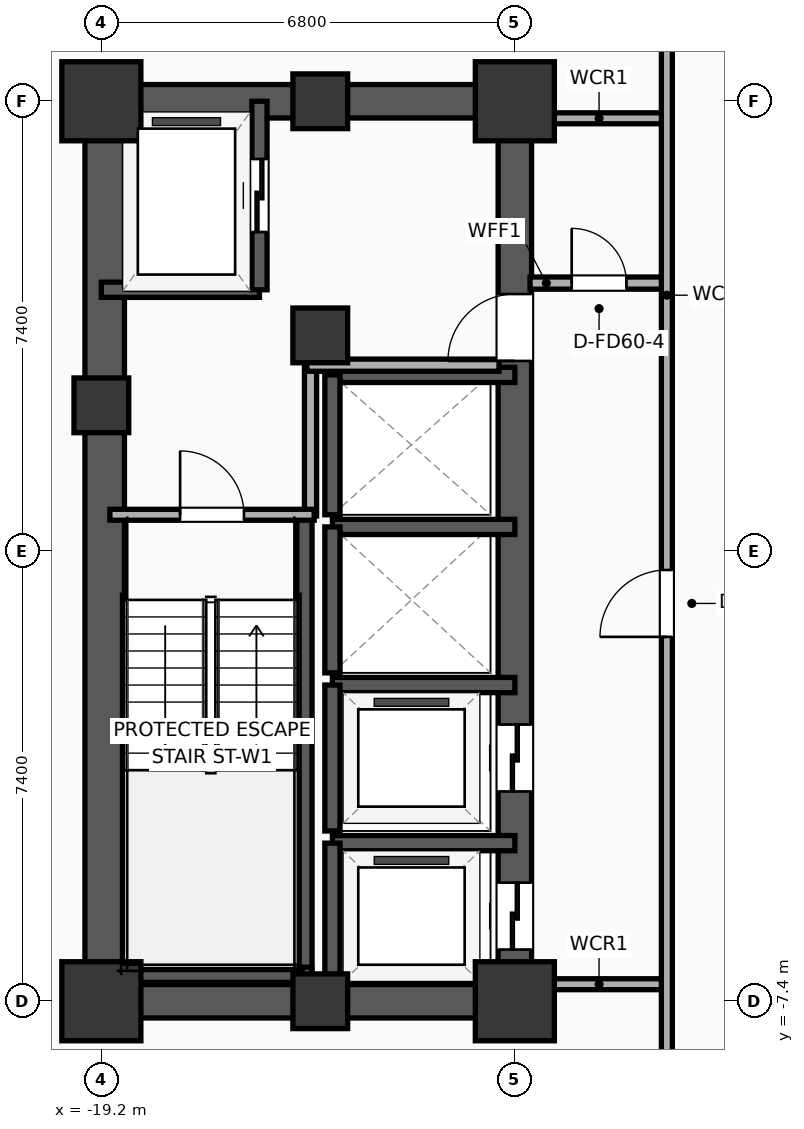
"""IFC4 building model, lengths in metres.
Left out: names, types, materials, properties, quantities, classifications, styles, units other than length and angle.
Written with IfcOpenShell. Run it as: python <this file> out.ifc"""

import sys

from ifc_helpers import new_model, si_unit, direction, frame, frame_2d, origin, origin_2d, place, context, subcontext, project, spatial, rectangle, extrude, element, fill, save


model = new_model("IFC4")
c1 = context("Model", 3, precision=1e-05, world=origin(), true_north=direction((0.0, 1.0)))
c2 = subcontext(c1, "Body", "Model", "MODEL_VIEW")
j1 = project(units=[si_unit("LENGTHUNIT", "METRE"), si_unit("PLANEANGLEUNIT", "RADIAN")], contexts=[c1])
p1 = place(None, origin())
s1 = spatial("IfcSite", under=j1, at=p1, CompositionType="ELEMENT")
p2 = place(p1, origin())
s2 = spatial("IfcBuilding", under=s1, at=p2, CompositionType="ELEMENT")
p3 = place(p2, frame((0.0, 0.0, 105.3)))
s3 = spatial("IfcBuildingStorey", under=s2, at=p3, CompositionType="ELEMENT", Elevation=105.3)
p4 = place(p3, frame((-19.2, -7.4, 0.0), z_axis=(0.0, 0.0, 1.0), x_axis=(1.0, 0.0, 0.0)))
e1 = element("IfcColumn", 1, at=p4, inside=s3, PredefinedType="COLUMN", context=c2, shape_type="SweptSolid", body=[
    extrude(rectangle(XDim=1.3, YDim=1.3, at=origin_2d()), origin(), (0.0, 0.0, 1.0), 3.9),
])
p5 = place(p3, frame((-19.2, 2.4, 0.0), z_axis=(0.0, 0.0, 1.0), x_axis=(1.0, 0.0, 0.0)))
e2 = element("IfcColumn", 2, at=p5, inside=s3, PredefinedType="COLUMN", context=c2, shape_type="SweptSolid", body=[
    extrude(rectangle(XDim=0.9, YDim=0.9, at=origin_2d()), origin(), (0.0, 0.0, 1.0), 3.9),
])
p6 = place(p3, frame((-19.2, 7.4, 0.0), z_axis=(0.0, 0.0, 1.0), x_axis=(1.0, 0.0, 0.0)))
e3 = element("IfcColumn", 3, at=p6, inside=s3, PredefinedType="COLUMN", context=c2, shape_type="SweptSolid", body=[
    extrude(rectangle(XDim=1.3, YDim=1.3, at=origin_2d()), origin(), (0.0, 0.0, 1.0), 3.9),
])
for number, where, z_axis, x_axis in (
    (4, (-15.6, -7.4, 0.0), (0.0, 0.0, 1.0), (1.0, 0.0, 0.0)),
    (5, (-15.6, 7.4, 0.0), (0.0, 0.0, 1.0), (1.0, 0.0, 0.0)),
):
    element("IfcColumn", number, at=place(p3, frame(where, z_axis=z_axis, x_axis=x_axis)), inside=s3, PredefinedType="COLUMN", context=c2, shape_type="SweptSolid", body=[
        extrude(rectangle(XDim=0.9, YDim=0.9, at=origin_2d()), origin(), (0.0, 0.0, 1.0), 3.9),
    ])
p7 = place(p3, frame((-12.4, -7.4, 0.0), z_axis=(0.0, 0.0, 1.0), x_axis=(1.0, 0.0, 0.0)))
e6 = element("IfcColumn", 6, at=p7, inside=s3, PredefinedType="COLUMN", context=c2, shape_type="SweptSolid", body=[
    extrude(rectangle(XDim=1.3, YDim=1.3, at=origin_2d()), origin(), (0.0, 0.0, 1.0), 3.9),
])
p8 = place(p3, frame((-15.6, 3.55, 0.0), z_axis=(0.0, 0.0, 1.0), x_axis=(1.0, 0.0, 0.0)))
e7 = element("IfcColumn", 7, at=p8, inside=s3, PredefinedType="COLUMN", context=c2, shape_type="SweptSolid", body=[
    extrude(rectangle(XDim=0.9, YDim=0.9, at=origin_2d()), origin(), (0.0, 0.0, 1.0), 3.9),
])
p9 = place(p3, frame((-12.4, 7.4, 0.0), z_axis=(0.0, 0.0, 1.0), x_axis=(1.0, 0.0, 0.0)))
e8 = element("IfcColumn", 8, at=p9, inside=s3, PredefinedType="COLUMN", context=c2, shape_type="SweptSolid", body=[
    extrude(rectangle(XDim=1.3, YDim=1.3, at=origin_2d()), origin(), (0.0, 0.0, 1.0), 3.9),
])
for number, where, z_axis, x_axis in (
    (9, (-19.475, -7.4, 0.0), (0.0, 0.0, 1.0), (1.0, 0.0, 0.0)),
    (10, (-19.475, 7.4, 0.0), (0.0, 0.0, 1.0), (1.0, 0.0, 0.0)),
):
    element("IfcWall", number, at=place(p3, frame(where, z_axis=z_axis, x_axis=x_axis)), inside=s3, PredefinedType="SHEAR", context=c2, shape_type="SweptSolid", body=[
        extrude(rectangle(XDim=7.35, YDim=0.55, at=frame_2d((3.675, 0.0))), origin(), (0.0, 0.0, 1.0), 3.65),
    ])
p10 = place(p3, frame((-19.145, -7.4, 0.0), z_axis=(0.0, 0.0, 1.0), x_axis=(0.0, 1.0, 0.0)))
e11 = element("IfcWall", 11, at=p10, inside=s3, PredefinedType="SHEAR", context=c2, shape_type="SweptSolid", body=[
    extrude(rectangle(XDim=14.8, YDim=0.65, at=frame_2d((7.4, 0.0))), origin(), (0.0, 0.0, 1.0), 3.65),
])
p11 = place(p3, frame((-12.4, -7.4, 0.0), z_axis=(0.0, 0.0, 1.0), x_axis=(0.0, 1.0, 0.0)))
e12 = element("IfcWall", 12, at=p11, inside=s3, PredefinedType="SHEAR", context=c2, shape_type="SweptSolid", body=[
    extrude(rectangle(XDim=14.8, YDim=0.55, at=frame_2d((7.4, 0.0))), origin(), (0.0, 0.0, 1.0), 3.65),
])
p12 = place(p11, frame((0.85, 0.0, 0.0)))
e13 = element("IfcOpeningElement", 13, at=p12, cuts=e12, PredefinedType="OPENING", context=c2, shape_type="SweptSolid", body=[
    extrude(rectangle(XDim=1.1, YDim=2.05, at=frame_2d((0.55, 1.025))), frame((0.0, 0.285, 0.0), z_axis=(0.0, -1.0, 0.0), x_axis=(1.0, 0.0, 0.0)), (0.0, 0.0, 1.0), 0.57),
])
p13 = place(p11, frame((3.45, 0.0, 0.0)))
e14 = element("IfcOpeningElement", 14, at=p13, cuts=e12, PredefinedType="OPENING", context=c2, shape_type="SweptSolid", body=[
    extrude(rectangle(XDim=1.1, YDim=2.05, at=frame_2d((0.55, 1.025))), frame((0.0, 0.285, 0.0), z_axis=(0.0, -1.0, 0.0), x_axis=(1.0, 0.0, 0.0)), (0.0, 0.0, 1.0), 0.57),
])
p14 = place(p11, frame((10.53, 0.0, 0.0)))
e15 = element("IfcOpeningElement", 15, at=p14, cuts=e12, PredefinedType="OPENING", context=c2, shape_type="SweptSolid", body=[
    extrude(rectangle(XDim=1.1, YDim=2.05, at=frame_2d((0.55, 1.025))), frame((0.0, 0.285, 0.0), z_axis=(0.0, -1.0, 0.0), x_axis=(1.0, 0.0, 0.0)), (0.0, 0.0, 1.0), 0.57),
])
p15 = place(p3, frame((-15.86, -7.085, 0.0), z_axis=(0.0, 0.0, 1.0), x_axis=(0.0, 1.0, 0.0)))
e16 = element("IfcWall", 16, at=p15, inside=s3, PredefinedType="SOLIDWALL", context=c2, shape_type="SweptSolid", body=[
    extrude(rectangle(XDim=7.685, YDim=0.25, at=frame_2d((3.843, 0.0))), origin(), (0.0, 0.0, 1.0), 3.65),
])
p16 = place(p3, frame((-19.2, -6.965, 0.0), z_axis=(0.0, 0.0, 1.0), x_axis=(1.0, 0.0, 0.0)))
e17 = element("IfcWall", 17, at=p16, inside=s3, PredefinedType="SOLIDWALL", context=c2, shape_type="SweptSolid", body=[
    extrude(rectangle(XDim=3.46, YDim=0.25, at=frame_2d((1.73, 0.0))), origin(), (0.0, 0.0, 1.0), 3.65),
])
p17 = place(p3, frame((-19.2, 4.3, 0.0), z_axis=(0.0, 0.0, 1.0), x_axis=(1.0, 0.0, 0.0)))
e18 = element("IfcWall", 18, at=p17, inside=s3, PredefinedType="SOLIDWALL", context=c2, shape_type="SweptSolid", body=[
    extrude(rectangle(XDim=2.6, YDim=0.25, at=frame_2d((1.3, 0.0))), origin(), (0.0, 0.0, 1.0), 3.65),
])
p18 = place(p3, frame((-16.6, 4.3, 0.0), z_axis=(0.0, 0.0, 1.0), x_axis=(0.0, 1.0, 0.0)))
e19 = element("IfcWall", 19, at=p18, inside=s3, PredefinedType="SOLIDWALL", context=c2, shape_type="SweptSolid", body=[
    extrude(rectangle(XDim=3.1, YDim=0.25, at=frame_2d((1.55, 0.0))), origin(), (0.0, 0.0, 1.0), 3.65),
])
p19 = place(p18, frame((0.95, 0.0, 0.0)))
e20 = element("IfcOpeningElement", 20, at=p19, cuts=e19, PredefinedType="OPENING", context=c2, shape_type="SweptSolid", body=[
    extrude(rectangle(XDim=1.2, YDim=2.05, at=frame_2d((0.6, 1.025))), frame((0.0, 0.135, 0.0), z_axis=(0.0, -1.0, 0.0), x_axis=(1.0, 0.0, 0.0)), (0.0, 0.0, 1.0), 0.27),
])
p20 = place(p3, frame((-12.4, -4.8, 0.0), z_axis=(0.0, 0.0, 1.0), x_axis=(-1.0, 0.0, 0.0)))
e21 = element("IfcWall", 21, at=p20, inside=s3, PredefinedType="SOLIDWALL", context=c2, shape_type="SweptSolid", body=[
    extrude(rectangle(XDim=3.0, YDim=0.25, at=frame_2d((1.5, 0.0))), origin(), (0.0, 0.0, 1.0), 3.65),
])
p21 = place(p3, frame((-15.4, -4.8, 0.0), z_axis=(0.0, 0.0, 1.0), x_axis=(0.0, -1.0, 0.0)))
e22 = element("IfcWall", 22, at=p21, inside=s3, PredefinedType="SOLIDWALL", context=c2, shape_type="SweptSolid", body=[
    extrude(rectangle(XDim=2.6, YDim=0.25, at=frame_2d((1.3, 0.0))), origin(), (0.0, 0.0, 1.0), 3.65),
])
p22 = place(p3, frame((-12.4, -2.2, 0.0), z_axis=(0.0, 0.0, 1.0), x_axis=(-1.0, 0.0, 0.0)))
e23 = element("IfcWall", 23, at=p22, inside=s3, PredefinedType="SOLIDWALL", context=c2, shape_type="SweptSolid", body=[
    extrude(rectangle(XDim=3.0, YDim=0.25, at=frame_2d((1.5, 0.0))), origin(), (0.0, 0.0, 1.0), 3.65),
])
p23 = place(p3, frame((-15.4, -2.2, 0.0), z_axis=(0.0, 0.0, 1.0), x_axis=(0.0, -1.0, 0.0)))
e24 = element("IfcWall", 24, at=p23, inside=s3, PredefinedType="SOLIDWALL", context=c2, shape_type="SweptSolid", body=[
    extrude(rectangle(XDim=2.4, YDim=0.25, at=frame_2d((1.2, 0.0))), origin(), (0.0, 0.0, 1.0), 3.65),
])
p24 = place(p3, frame((-12.4, 0.4, 0.0), z_axis=(0.0, 0.0, 1.0), x_axis=(-1.0, 0.0, 0.0)))
e25 = element("IfcWall", 25, at=p24, inside=s3, PredefinedType="SOLIDWALL", context=c2, shape_type="SweptSolid", body=[
    extrude(rectangle(XDim=3.0, YDim=0.25, at=frame_2d((1.5, 0.0))), origin(), (0.0, 0.0, 1.0), 3.65),
])
p25 = place(p3, frame((-15.4, 0.4, 0.0), z_axis=(0.0, 0.0, 1.0), x_axis=(0.0, -1.0, 0.0)))
e26 = element("IfcWall", 26, at=p25, inside=s3, PredefinedType="SOLIDWALL", context=c2, shape_type="SweptSolid", body=[
    extrude(rectangle(XDim=2.4, YDim=0.25, at=frame_2d((1.2, 0.0))), origin(), (0.0, 0.0, 1.0), 3.65),
])
p26 = place(p3, frame((-12.4, 2.9, 0.0), z_axis=(0.0, 0.0, 1.0), x_axis=(-1.0, 0.0, 0.0)))
e27 = element("IfcWall", 27, at=p26, inside=s3, PredefinedType="SOLIDWALL", context=c2, shape_type="SweptSolid", body=[
    extrude(rectangle(XDim=3.0, YDim=0.25, at=frame_2d((1.5, 0.0))), origin(), (0.0, 0.0, 1.0), 3.65),
])
p27 = place(p3, frame((-15.4, 2.9, 0.0), z_axis=(0.0, 0.0, 1.0), x_axis=(0.0, -1.0, 0.0)))
e28 = element("IfcWall", 28, at=p27, inside=s3, PredefinedType="SOLIDWALL", context=c2, shape_type="SweptSolid", body=[
    extrude(rectangle(XDim=2.3, YDim=0.25, at=frame_2d((1.15, 0.0))), origin(), (0.0, 0.0, 1.0), 3.65),
])
p28 = place(p3, frame((-15.76, 0.58, 0.0), z_axis=(0.0, 0.0, 1.0), x_axis=(0.0, 1.0, 0.0)))
e29 = element("IfcWall", 29, at=p28, inside=s3, PredefinedType="PARTITIONING", context=c2, shape_type="SweptSolid", body=[
    extrude(rectangle(XDim=2.52, YDim=0.2, at=frame_2d((1.26, 0.0))), origin(), (0.0, 0.0, 1.0), 3.65),
])
p29 = place(p3, frame((-15.82, 3.06, 0.0), z_axis=(0.0, 0.0, 1.0), x_axis=(1.0, 0.0, 0.0)))
e30 = element("IfcWall", 30, at=p29, inside=s3, PredefinedType="PARTITIONING", context=c2, shape_type="SweptSolid", body=[
    extrude(rectangle(XDim=3.16, YDim=0.2, at=frame_2d((1.58, 0.0))), origin(), (0.0, 0.0, 1.0), 3.65),
])
p30 = place(p3, frame((-19.06, 0.6, 0.0), z_axis=(0.0, 0.0, 1.0), x_axis=(1.0, 0.0, 0.0)))
e31 = element("IfcWall", 31, at=p30, inside=s3, PredefinedType="PARTITIONING", context=c2, shape_type="SweptSolid", body=[
    extrude(rectangle(XDim=3.36, YDim=0.18, at=frame_2d((1.68, 0.0))), origin(), (0.0, 0.0, 1.0), 3.65),
])
p31 = place(p30, frame((1.155, 0.0, 0.0)))
e32 = element("IfcOpeningElement", 32, at=p31, cuts=e31, PredefinedType="OPENING", context=c2, shape_type="SweptSolid", body=[
    extrude(rectangle(XDim=1.05, YDim=2.05, at=frame_2d((0.525, 1.025))), frame((0.0, 0.1, 0.0), z_axis=(0.0, -1.0, 0.0), x_axis=(1.0, 0.0, 0.0)), (0.0, 0.0, 1.0), 0.2),
])
p32 = place(p3, frame((-12.15, 4.41, 0.0), z_axis=(0.0, 0.0, 1.0), x_axis=(1.0, 0.0, 0.0)))
e33 = element("IfcWall", 33, at=p32, inside=s3, PredefinedType="PARTITIONING", context=c2, shape_type="SweptSolid", body=[
    extrude(rectangle(XDim=2.27, YDim=0.2, at=frame_2d((1.135, 0.0))), origin(), (0.0, 0.0, 1.0), 3.65),
])
p33 = place(p32, frame((0.685, 0.0, 0.0)))
e34 = element("IfcOpeningElement", 34, at=p33, cuts=e33, PredefinedType="OPENING", context=c2, shape_type="SweptSolid", body=[
    extrude(rectangle(XDim=0.9, YDim=2.05, at=frame_2d((0.45, 1.025))), frame((0.0, 0.11, 0.0), z_axis=(0.0, -1.0, 0.0), x_axis=(1.0, 0.0, 0.0)), (0.0, 0.0, 1.0), 0.22),
])
for number, where, z_axis, x_axis in (
    (35, (-12.15, 7.12, 0.0), (0.0, 0.0, 1.0), (1.0, 0.0, 0.0)),
    (36, (-12.15, -7.12, 0.0), (0.0, 0.0, 1.0), (1.0, 0.0, 0.0)),
):
    element("IfcWall", number, at=place(p3, frame(where, z_axis=z_axis, x_axis=x_axis)), inside=s3, PredefinedType="PARTITIONING", context=c2, shape_type="SweptSolid", body=[
        extrude(rectangle(XDim=2.27, YDim=0.18, at=frame_2d((1.135, 0.0))), origin(), (0.0, 0.0, 1.0), 3.65),
    ])
p34 = place(p3, frame((-9.9, -8.58, 0.0), z_axis=(0.0, 0.0, 1.0), x_axis=(0.0, 1.0, 0.0)))
e37 = element("IfcWall", 37, at=p34, inside=s3, PredefinedType="PARTITIONING", context=c2, shape_type="SweptSolid", body=[
    extrude(rectangle(XDim=17.16, YDim=0.18, at=frame_2d((8.58, 0.0))), origin(), (0.0, 0.0, 1.0), 3.65),
])
p35 = place(p34, frame((7.172, 0.0, 0.0)))
e38 = element("IfcOpeningElement", 38, at=p35, cuts=e37, PredefinedType="OPENING", context=c2, shape_type="SweptSolid", body=[
    extrude(rectangle(XDim=1.1, YDim=2.05, at=frame_2d((0.55, 1.025))), frame((0.0, 0.1, 0.0), z_axis=(0.0, -1.0, 0.0), x_axis=(1.0, 0.0, 0.0)), (0.0, 0.0, 1.0), 0.2),
])
p36 = place(p19, origin())
e39 = element("IfcDoor", 39, at=p36, inside=s3, OperationType="SLIDING_TO_LEFT", PredefinedType="DOOR", context=c2, shape_type="SweptSolid", body=[
    extrude(rectangle(XDim=1.2, YDim=2.05, at=frame_2d((0.6, 1.025))), frame((0.0, 0.025, 0.0), z_axis=(0.0, -1.0, 0.0), x_axis=(1.0, 0.0, 0.0)), (0.0, 0.0, 1.0), 0.05),
])
fill(e20, e39)
p37 = place(p12, origin())
e40 = element("IfcDoor", 40, at=p37, inside=s3, OperationType="SLIDING_TO_LEFT", PredefinedType="DOOR", context=c2, shape_type="SweptSolid", body=[
    extrude(rectangle(XDim=1.1, YDim=2.05, at=frame_2d((0.55, 1.025))), frame((0.0, 0.025, 0.0), z_axis=(0.0, -1.0, 0.0), x_axis=(1.0, 0.0, 0.0)), (0.0, 0.0, 1.0), 0.05),
])
fill(e13, e40)
p38 = place(p13, origin())
e41 = element("IfcDoor", 41, at=p38, inside=s3, OperationType="SLIDING_TO_LEFT", PredefinedType="DOOR", context=c2, shape_type="SweptSolid", body=[
    extrude(rectangle(XDim=1.1, YDim=2.05, at=frame_2d((0.55, 1.025))), frame((0.0, 0.025, 0.0), z_axis=(0.0, -1.0, 0.0), x_axis=(1.0, 0.0, 0.0)), (0.0, 0.0, 1.0), 0.05),
])
fill(e14, e41)
p39 = place(p31, origin())
e42 = element("IfcDoor", 42, at=p39, inside=s3, OperationType="SINGLE_SWING_LEFT", PredefinedType="DOOR", context=c2, shape_type="SweptSolid", body=[
    extrude(rectangle(XDim=1.05, YDim=2.05, at=frame_2d((0.525, 1.025))), frame((0.0, 0.025, 0.0), z_axis=(0.0, -1.0, 0.0), x_axis=(1.0, 0.0, 0.0)), (0.0, 0.0, 1.0), 0.05),
])
fill(e32, e42)
p40 = place(p33, origin())
e43 = element("IfcDoor", 43, at=p40, inside=s3, OperationType="SINGLE_SWING_LEFT", PredefinedType="DOOR", context=c2, shape_type="SweptSolid", body=[
    extrude(rectangle(XDim=0.9, YDim=2.05, at=frame_2d((0.45, 1.025))), frame((0.0, 0.025, 0.0), z_axis=(0.0, -1.0, 0.0), x_axis=(1.0, 0.0, 0.0)), (0.0, 0.0, 1.0), 0.05),
])
fill(e34, e43)
p41 = place(p35, origin())
e44 = element("IfcDoor", 44, at=p41, inside=s3, OperationType="SINGLE_SWING_LEFT", PredefinedType="DOOR", context=c2, shape_type="SweptSolid", body=[
    extrude(rectangle(XDim=1.1, YDim=2.05, at=frame_2d((0.55, 1.025))), frame((0.0, 0.025, 0.0), z_axis=(0.0, -1.0, 0.0), x_axis=(1.0, 0.0, 0.0)), (0.0, 0.0, 1.0), 0.05),
])
fill(e38, e44)
p42 = place(p14, origin())
e45 = element("IfcDoor", 45, at=p42, inside=s3, OperationType="SINGLE_SWING_LEFT", PredefinedType="DOOR", context=c2, shape_type="SweptSolid", body=[
    extrude(rectangle(XDim=1.1, YDim=2.05, at=frame_2d((0.55, 1.025))), frame((0.0, 0.025, 0.0), z_axis=(0.0, -1.0, 0.0), x_axis=(1.0, 0.0, 0.0)), (0.0, 0.0, 1.0), 0.05),
])
fill(e15, e45)
save(model, sys.argv[1])
